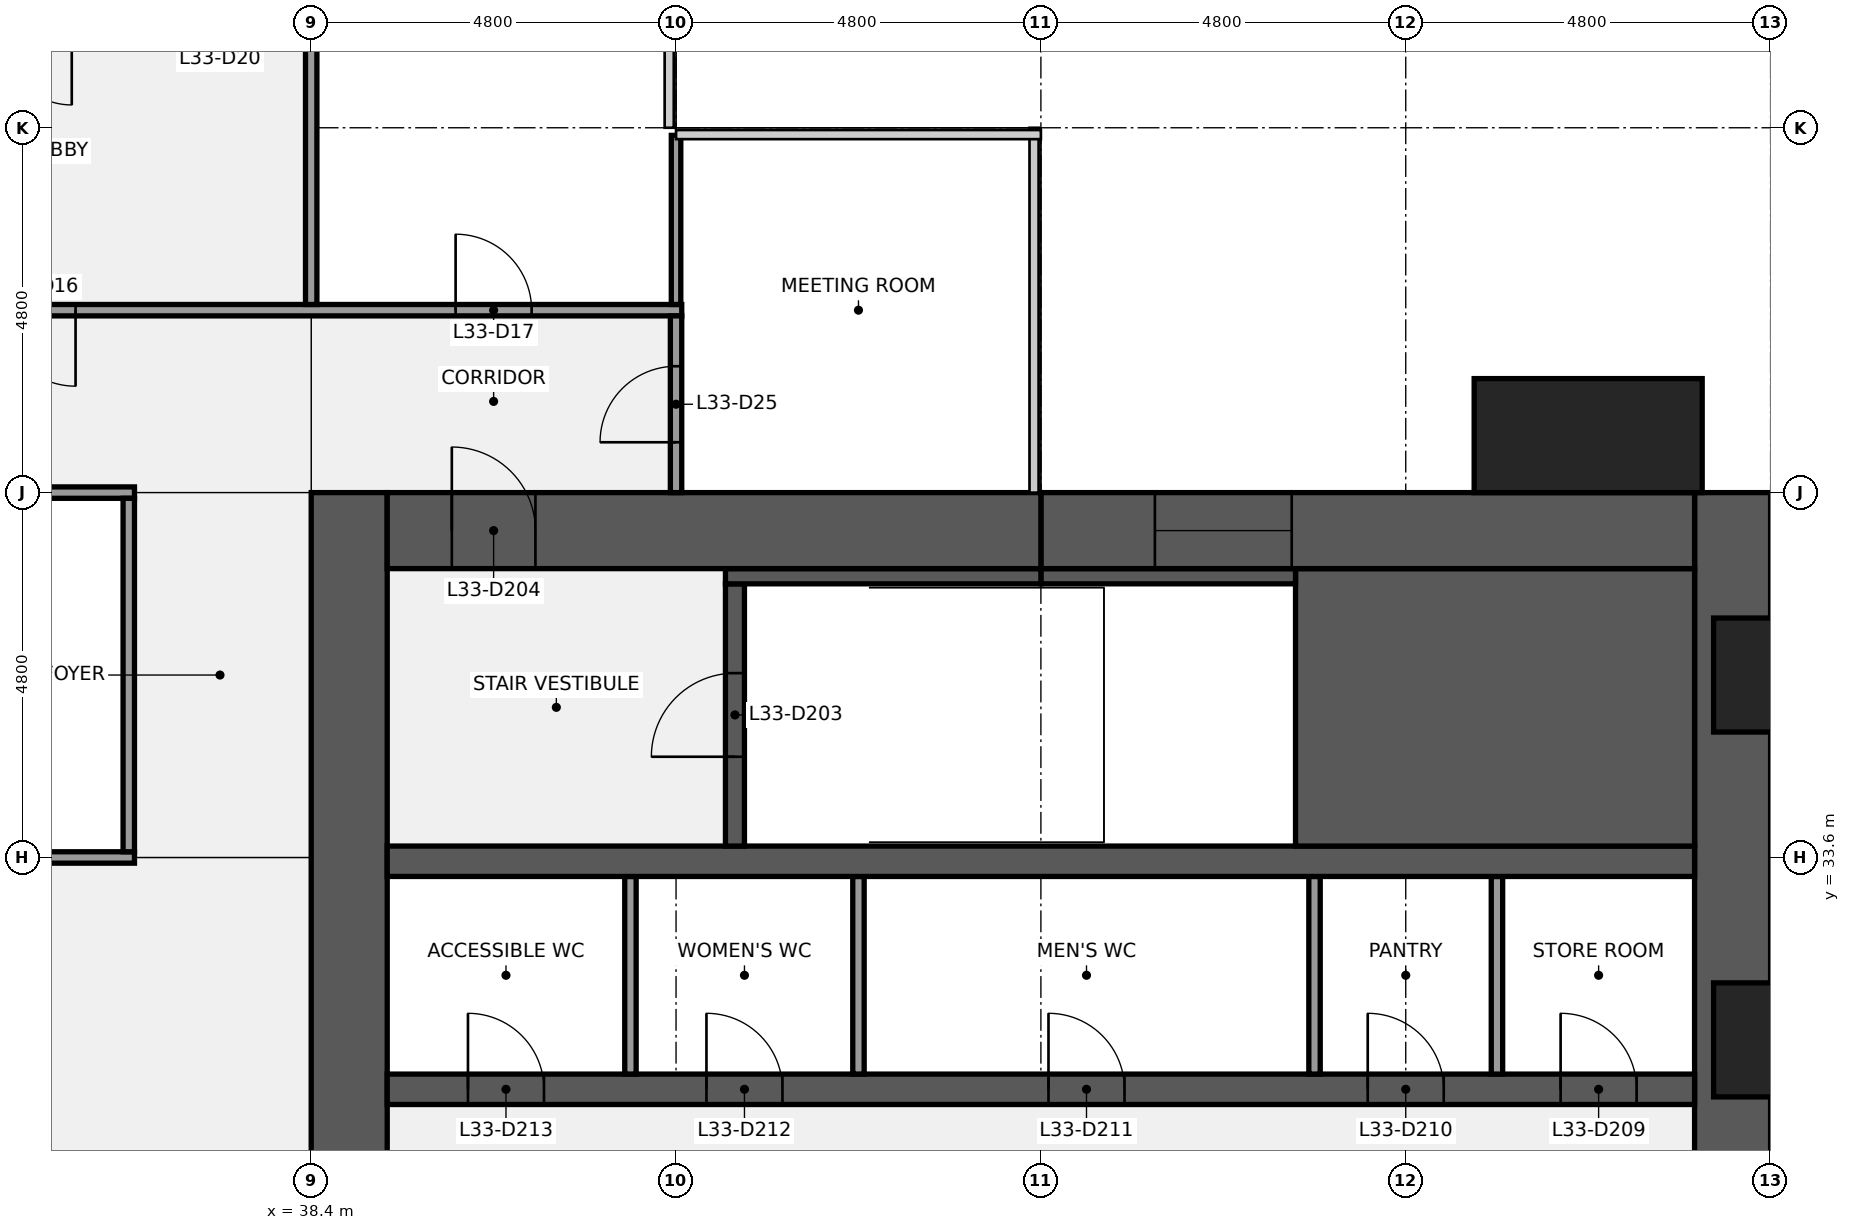
"""IFC4 building model, lengths in metres.
Left out: names, types, materials, properties, quantities, classifications, styles, units other than length and angle.
Written with IfcOpenShell. Run it as: python <this file> out.ifc"""

import sys

from ifc_helpers import new_model, si_unit, direction, frame, frame_2d, origin, origin_2d, place, context, subcontext, project, spatial, rectangle, extrude, element, fill, save


model = new_model("IFC4")
c1 = context("Model", 3, precision=1e-05, world=origin(), true_north=direction((0.0, 1.0)))
c2 = subcontext(c1, "Body", "Model", "MODEL_VIEW")
j1 = project(units=[si_unit("LENGTHUNIT", "METRE"), si_unit("PLANEANGLEUNIT", "RADIAN")], contexts=[c1])
p1 = place(None, origin())
s1 = spatial("IfcSite", under=j1, at=p1, CompositionType="ELEMENT")
p2 = place(p1, origin())
s2 = spatial("IfcBuilding", under=s1, at=p2, CompositionType="ELEMENT")
p3 = place(p2, frame((0.0, 0.0, 152.1)))
s3 = spatial("IfcBuildingStorey", under=s2, at=p3, CompositionType="ELEMENT", Elevation=152.1)
p4 = place(p3, frame((57.1, 38.4, 0.0), z_axis=(0.0, 0.0, 1.0), x_axis=(0.0, -1.0, 0.0)))
e1 = element("IfcWall", 1, at=p4, inside=s3, PredefinedType="SHEAR", context=c2, shape_type="SweptSolid", body=[
    extrude(rectangle(XDim=28.8, YDim=1.0, at=frame_2d((14.4, 0.0))), origin(), (0.0, 0.0, 1.0), 3.84),
])
p5 = place(p4, frame((18.45, 0.0, 0.9)))
e2 = element("IfcOpeningElement", 2, at=p5, cuts=e1, PredefinedType="OPENING", context=c2, shape_type="SweptSolid", body=[
    extrude(rectangle(XDim=1.5, YDim=1.5, at=frame_2d((0.75, 0.75))), frame((0.0, 0.51, 0.0), z_axis=(0.0, -1.0, 0.0), x_axis=(1.0, 0.0, 0.0)), (0.0, 0.0, 1.0), 1.02),
])
p6 = place(p4, frame((8.85, 0.0, 0.9)))
e3 = element("IfcOpeningElement", 3, at=p6, cuts=e1, PredefinedType="OPENING", context=c2, shape_type="SweptSolid", body=[
    extrude(rectangle(XDim=1.5, YDim=1.5, at=frame_2d((0.75, 0.75))), frame((0.0, 0.51, 0.0), z_axis=(0.0, -1.0, 0.0), x_axis=(1.0, 0.0, 0.0)), (0.0, 0.0, 1.0), 1.02),
])
p7 = place(p3, frame((38.9, 9.6, 0.0), z_axis=(0.0, 0.0, 1.0), x_axis=(0.0, 1.0, 0.0)))
e4 = element("IfcWall", 4, at=p7, inside=s3, PredefinedType="SHEAR", context=c2, shape_type="SweptSolid", body=[
    extrude(rectangle(XDim=28.8, YDim=1.0, at=frame_2d((14.4, 0.0))), origin(), (0.0, 0.0, 1.0), 3.84),
])
p8 = place(p7, frame((8.7, 0.0, 0.0)))
e5 = element("IfcOpeningElement", 5, at=p8, cuts=e4, PredefinedType="OPENING", context=c2, shape_type="SweptSolid", body=[
    extrude(rectangle(XDim=1.8, YDim=2.1, at=frame_2d((0.9, 1.05))), frame((0.0, 0.51, 0.0), z_axis=(0.0, -1.0, 0.0), x_axis=(1.0, 0.0, 0.0)), (0.0, 0.0, 1.0), 1.02),
])
p9 = place(p7, frame((18.3, 0.0, 0.0)))
e6 = element("IfcOpeningElement", 6, at=p9, cuts=e4, PredefinedType="OPENING", context=c2, shape_type="SweptSolid", body=[
    extrude(rectangle(XDim=1.8, YDim=2.1, at=frame_2d((0.9, 1.05))), frame((0.0, 0.51, 0.0), z_axis=(0.0, -1.0, 0.0), x_axis=(1.0, 0.0, 0.0)), (0.0, 0.0, 1.0), 1.02),
])
p10 = place(p3, frame((39.4, 30.55, 0.0), z_axis=(0.0, 0.0, 1.0), x_axis=(1.0, 0.0, 0.0)))
e7 = element("IfcWall", 7, at=p10, inside=s3, PredefinedType="SHEAR", context=c2, shape_type="SweptSolid", body=[
    extrude(rectangle(XDim=17.2, YDim=0.4, at=frame_2d((8.6, 0.0))), origin(), (0.0, 0.0, 1.0), 3.84),
])
p11 = place(p10, frame((15.438, 0.0, 0.0)))
e8 = element("IfcOpeningElement", 8, at=p11, cuts=e7, PredefinedType="OPENING", context=c2, shape_type="SweptSolid", body=[
    extrude(rectangle(XDim=1.0, YDim=2.1, at=frame_2d((0.5, 1.05))), frame((0.0, 0.21, 0.0), z_axis=(0.0, -1.0, 0.0), x_axis=(1.0, 0.0, 0.0)), (0.0, 0.0, 1.0), 0.42),
])
p12 = place(p10, frame((12.9, 0.0, 0.0)))
e9 = element("IfcOpeningElement", 9, at=p12, cuts=e7, PredefinedType="OPENING", context=c2, shape_type="SweptSolid", body=[
    extrude(rectangle(XDim=1.0, YDim=2.1, at=frame_2d((0.5, 1.05))), frame((0.0, 0.21, 0.0), z_axis=(0.0, -1.0, 0.0), x_axis=(1.0, 0.0, 0.0)), (0.0, 0.0, 1.0), 0.42),
])
p13 = place(p10, frame((8.7, 0.0, 0.0)))
e10 = element("IfcOpeningElement", 10, at=p13, cuts=e7, PredefinedType="OPENING", context=c2, shape_type="SweptSolid", body=[
    extrude(rectangle(XDim=1.0, YDim=2.1, at=frame_2d((0.5, 1.05))), frame((0.0, 0.21, 0.0), z_axis=(0.0, -1.0, 0.0), x_axis=(1.0, 0.0, 0.0)), (0.0, 0.0, 1.0), 0.42),
])
p14 = place(p10, frame((4.2, 0.0, 0.0)))
e11 = element("IfcOpeningElement", 11, at=p14, cuts=e7, PredefinedType="OPENING", context=c2, shape_type="SweptSolid", body=[
    extrude(rectangle(XDim=1.0, YDim=2.1, at=frame_2d((0.5, 1.05))), frame((0.0, 0.21, 0.0), z_axis=(0.0, -1.0, 0.0), x_axis=(1.0, 0.0, 0.0)), (0.0, 0.0, 1.0), 0.42),
])
p15 = place(p10, frame((1.062, 0.0, 0.0)))
e12 = element("IfcOpeningElement", 12, at=p15, cuts=e7, PredefinedType="OPENING", context=c2, shape_type="SweptSolid", body=[
    extrude(rectangle(XDim=1.0, YDim=2.1, at=frame_2d((0.5, 1.05))), frame((0.0, 0.21, 0.0), z_axis=(0.0, -1.0, 0.0), x_axis=(1.0, 0.0, 0.0)), (0.0, 0.0, 1.0), 0.42),
])
for number, where, z_axis, x_axis in (
    (13, (54.0, 30.75, 0.0), (0.0, 0.0, 1.0), (0.0, 1.0, 0.0)),
    (14, (51.6, 30.75, 0.0), (0.0, 0.0, 1.0), (0.0, 1.0, 0.0)),
    (15, (45.6, 30.75, 0.0), (0.0, 0.0, 1.0), (0.0, 1.0, 0.0)),
    (16, (42.6, 30.75, 0.0), (0.0, 0.0, 1.0), (0.0, 1.0, 0.0)),
):
    element("IfcWall", number, at=place(p3, frame(where, z_axis=z_axis, x_axis=x_axis)), inside=s3, PredefinedType="PARTITIONING", context=c2, shape_type="SweptSolid", body=[
        extrude(rectangle(XDim=2.6, YDim=0.15, at=frame_2d((1.3, 0.0))), origin(), (0.0, 0.0, 1.0), 3.84),
    ])
p16 = place(p3, frame((39.4, 33.55, 0.0), z_axis=(0.0, 0.0, 1.0), x_axis=(1.0, 0.0, 0.0)))
e17 = element("IfcWall", 17, at=p16, inside=s3, PredefinedType="SHEAR", context=c2, shape_type="SweptSolid", body=[
    extrude(rectangle(XDim=17.2, YDim=0.4, at=frame_2d((8.6, 0.0))), origin(), (0.0, 0.0, 1.0), 3.84),
])
p17 = place(p3, frame((51.35, 35.575, 0.0), z_axis=(0.0, 0.0, 1.0), x_axis=(1.0, 0.0, 0.0)))
e18 = element("IfcWall", 18, at=p17, inside=s3, PredefinedType="SHEAR", context=c2, shape_type="SweptSolid", body=[
    extrude(rectangle(XDim=5.25, YDim=3.65, at=frame_2d((2.625, 0.0))), origin(), (0.0, 0.0, 1.0), 3.84),
])
p18 = place(p3, frame((43.975, 33.75, 0.0), z_axis=(0.0, 0.0, 1.0), x_axis=(0.0, 1.0, 0.0)))
e19 = element("IfcWall", 19, at=p18, inside=s3, PredefinedType="SHEAR", context=c2, shape_type="SweptSolid", body=[
    extrude(rectangle(XDim=3.45, YDim=0.25, at=frame_2d((1.725, 0.0))), origin(), (0.0, 0.0, 1.0), 3.84),
])
p19 = place(p18, frame((1.175, 0.0, 0.0)))
e20 = element("IfcOpeningElement", 20, at=p19, cuts=e19, PredefinedType="OPENING", context=c2, shape_type="SweptSolid", body=[
    extrude(rectangle(XDim=1.1, YDim=2.1, at=frame_2d((0.55, 1.05))), frame((0.0, 0.135, 0.0), z_axis=(0.0, -1.0, 0.0), x_axis=(1.0, 0.0, 0.0)), (0.0, 0.0, 1.0), 0.27),
])
p20 = place(p3, frame((48.0, 37.3, 0.0), z_axis=(0.0, 0.0, 1.0), x_axis=(1.0, 0.0, 0.0)))
e21 = element("IfcWall", 21, at=p20, inside=s3, PredefinedType="SHEAR", context=c2, shape_type="SweptSolid", body=[
    extrude(rectangle(XDim=3.35, YDim=0.2, at=frame_2d((1.675, 0.0))), origin(), (0.0, 0.0, 1.0), 3.84),
])
p21 = place(p3, frame((43.85, 37.3, 0.0), z_axis=(0.0, 0.0, 1.0), x_axis=(1.0, 0.0, 0.0)))
e22 = element("IfcWall", 22, at=p21, inside=s3, PredefinedType="SHEAR", context=c2, shape_type="SweptSolid", body=[
    extrude(rectangle(XDim=4.15, YDim=0.2, at=frame_2d((2.075, 0.0))), origin(), (0.0, 0.0, 1.0), 3.84),
])
p22 = place(p3, frame((48.0, 37.9, 0.0), z_axis=(0.0, 0.0, 1.0), x_axis=(1.0, 0.0, 0.0)))
e23 = element("IfcWall", 23, at=p22, inside=s3, PredefinedType="SHEAR", context=c2, shape_type="SweptSolid", body=[
    extrude(rectangle(XDim=8.6, YDim=1.0, at=frame_2d((4.3, 0.0))), origin(), (0.0, 0.0, 1.0), 3.84),
])
p23 = place(p22, frame((1.5, 0.0, 0.9)))
e24 = element("IfcOpeningElement", 24, at=p23, cuts=e23, PredefinedType="OPENING", context=c2, shape_type="SweptSolid", body=[
    extrude(rectangle(XDim=1.8, YDim=1.5, at=frame_2d((0.9, 0.75))), frame((0.0, 0.51, 0.0), z_axis=(0.0, -1.0, 0.0), x_axis=(1.0, 0.0, 0.0)), (0.0, 0.0, 1.0), 1.02),
])
p24 = place(p3, frame((39.4, 37.9, 0.0), z_axis=(0.0, 0.0, 1.0), x_axis=(1.0, 0.0, 0.0)))
e25 = element("IfcWall", 25, at=p24, inside=s3, PredefinedType="SHEAR", context=c2, shape_type="SweptSolid", body=[
    extrude(rectangle(XDim=8.6, YDim=1.0, at=frame_2d((4.3, 0.0))), origin(), (0.0, 0.0, 1.0), 3.84),
])
p25 = place(p24, frame((0.85, 0.0, 0.0)))
e26 = element("IfcOpeningElement", 26, at=p25, cuts=e25, PredefinedType="OPENING", context=c2, shape_type="SweptSolid", body=[
    extrude(rectangle(XDim=1.1, YDim=2.1, at=frame_2d((0.55, 1.05))), frame((0.0, 0.51, 0.0), z_axis=(0.0, -1.0, 0.0), x_axis=(1.0, 0.0, 0.0)), (0.0, 0.0, 1.0), 1.02),
])
p26 = place(p3, frame((31.275, 33.6, 0.0), z_axis=(0.0, 0.0, 1.0), x_axis=(1.0, 0.0, 0.0)))
e27 = element("IfcWall", 27, at=p26, inside=s3, PredefinedType="PARTITIONING", context=c2, shape_type="SweptSolid", body=[
    extrude(rectangle(XDim=4.8, YDim=0.15, at=frame_2d((2.4, 0.0))), origin(), (0.0, 0.0, 1.0), 2.936),
])
p27 = place(p3, frame((21.525, 38.4, 0.0), z_axis=(0.0, 0.0, 1.0), x_axis=(1.0, 0.0, 0.0)))
e28 = element("IfcWall", 28, at=p27, inside=s3, PredefinedType="PARTITIONING", context=c2, shape_type="SweptSolid", body=[
    extrude(rectangle(XDim=14.55, YDim=0.15, at=frame_2d((7.275, 0.0))), origin(), (0.0, 0.0, 1.0), 2.936),
])
p28 = place(p27, frame((3.175, 0.0, 0.0)))
e29 = element("IfcOpeningElement", 29, at=p28, cuts=e28, PredefinedType="OPENING", context=c2, shape_type="SweptSolid", body=[
    extrude(rectangle(XDim=1.0, YDim=2.1, at=frame_2d((0.5, 1.05))), frame((0.0, 0.085, 0.0), z_axis=(0.0, -1.0, 0.0), x_axis=(1.0, 0.0, 0.0)), (0.0, 0.0, 1.0), 0.17),
])
p29 = place(p27, frame((10.375, 0.0, 0.0)))
e30 = element("IfcOpeningElement", 30, at=p29, cuts=e28, PredefinedType="OPENING", context=c2, shape_type="SweptSolid", body=[
    extrude(rectangle(XDim=1.0, YDim=2.1, at=frame_2d((0.5, 1.05))), frame((0.0, 0.085, 0.0), z_axis=(0.0, -1.0, 0.0), x_axis=(1.0, 0.0, 0.0)), (0.0, 0.0, 1.0), 0.17),
])
p30 = place(p3, frame((14.325, 40.8, 0.0), z_axis=(0.0, 0.0, 1.0), x_axis=(1.0, 0.0, 0.0)))
e31 = element("IfcWall", 31, at=p30, inside=s3, PredefinedType="PARTITIONING", context=c2, shape_type="SweptSolid", body=[
    extrude(rectangle(XDim=28.95, YDim=0.15, at=frame_2d((14.475, 0.0))), origin(), (0.0, 0.0, 1.0), 2.936),
])
p31 = place(p30, frame((1.975, 0.0, 0.0)))
e32 = element("IfcOpeningElement", 32, at=p31, cuts=e31, PredefinedType="OPENING", context=c2, shape_type="SweptSolid", body=[
    extrude(rectangle(XDim=1.0, YDim=2.1, at=frame_2d((0.5, 1.05))), frame((0.0, 0.085, 0.0), z_axis=(0.0, -1.0, 0.0), x_axis=(1.0, 0.0, 0.0)), (0.0, 0.0, 1.0), 0.17),
])
p32 = place(p30, frame((5.575, 0.0, 0.0)))
e33 = element("IfcOpeningElement", 33, at=p32, cuts=e31, PredefinedType="OPENING", context=c2, shape_type="SweptSolid", body=[
    extrude(rectangle(XDim=1.0, YDim=2.1, at=frame_2d((0.5, 1.05))), frame((0.0, 0.085, 0.0), z_axis=(0.0, -1.0, 0.0), x_axis=(1.0, 0.0, 0.0)), (0.0, 0.0, 1.0), 0.17),
])
p33 = place(p30, frame((9.175, 0.0, 0.0)))
e34 = element("IfcOpeningElement", 34, at=p33, cuts=e31, PredefinedType="OPENING", context=c2, shape_type="SweptSolid", body=[
    extrude(rectangle(XDim=1.0, YDim=2.1, at=frame_2d((0.5, 1.05))), frame((0.0, 0.085, 0.0), z_axis=(0.0, -1.0, 0.0), x_axis=(1.0, 0.0, 0.0)), (0.0, 0.0, 1.0), 0.17),
])
p34 = place(p30, frame((13.975, 0.0, 0.0)))
e35 = element("IfcOpeningElement", 35, at=p34, cuts=e31, PredefinedType="OPENING", context=c2, shape_type="SweptSolid", body=[
    extrude(rectangle(XDim=1.0, YDim=2.1, at=frame_2d((0.5, 1.05))), frame((0.0, 0.085, 0.0), z_axis=(0.0, -1.0, 0.0), x_axis=(1.0, 0.0, 0.0)), (0.0, 0.0, 1.0), 0.17),
])
p35 = place(p30, frame((19.975, 0.0, 0.0)))
e36 = element("IfcOpeningElement", 36, at=p35, cuts=e31, PredefinedType="OPENING", context=c2, shape_type="SweptSolid", body=[
    extrude(rectangle(XDim=1.0, YDim=2.1, at=frame_2d((0.5, 1.05))), frame((0.0, 0.085, 0.0), z_axis=(0.0, -1.0, 0.0), x_axis=(1.0, 0.0, 0.0)), (0.0, 0.0, 1.0), 0.17),
])
p36 = place(p30, frame((25.975, 0.0, 0.0)))
e37 = element("IfcOpeningElement", 37, at=p36, cuts=e31, PredefinedType="OPENING", context=c2, shape_type="SweptSolid", body=[
    extrude(rectangle(XDim=1.0, YDim=2.1, at=frame_2d((0.5, 1.05))), frame((0.0, 0.085, 0.0), z_axis=(0.0, -1.0, 0.0), x_axis=(1.0, 0.0, 0.0)), (0.0, 0.0, 1.0), 0.17),
])
p37 = place(p3, frame((36.0, 33.675, 0.0), z_axis=(0.0, 0.0, 1.0), x_axis=(0.0, 1.0, 0.0)))
e38 = element("IfcWall", 38, at=p37, inside=s3, PredefinedType="PARTITIONING", context=c2, shape_type="SweptSolid", body=[
    extrude(rectangle(XDim=4.65, YDim=0.15, at=frame_2d((2.325, 0.0))), origin(), (0.0, 0.0, 1.0), 2.936),
])
p38 = place(p3, frame((38.4, 40.875, 0.0), z_axis=(0.0, 0.0, 1.0), x_axis=(0.0, 1.0, 0.0)))
e39 = element("IfcWall", 39, at=p38, inside=s3, PredefinedType="PARTITIONING", context=c2, shape_type="SweptSolid", body=[
    extrude(rectangle(XDim=3.45, YDim=0.15, at=frame_2d((1.725, 0.0))), origin(), (0.0, 0.0, 1.0), 2.936),
])
p39 = place(p3, frame((43.2, 40.875, 0.0), z_axis=(0.0, 0.0, 1.0), x_axis=(0.0, 1.0, 0.0)))
e40 = element("IfcWall", 40, at=p39, inside=s3, PredefinedType="PARTITIONING", context=c2, shape_type="SweptSolid", body=[
    extrude(rectangle(XDim=2.225, YDim=0.125, at=frame_2d((1.113, 0.0))), origin(), (0.0, 0.0, 1.0), 2.936),
])
p40 = place(p3, frame((43.2, 38.4, 0.0), z_axis=(0.0, 0.0, 1.0), x_axis=(0.0, 1.0, 0.0)))
e41 = element("IfcWall", 41, at=p40, inside=s3, PredefinedType="PARTITIONING", context=c2, shape_type="SweptSolid", body=[
    extrude(rectangle(XDim=2.325, YDim=0.15, at=frame_2d((1.163, 0.0))), origin(), (0.0, 0.0, 1.0), 2.936),
])
p41 = place(p40, frame((0.663, 0.0, 0.0)))
e42 = element("IfcOpeningElement", 42, at=p41, cuts=e41, PredefinedType="OPENING", context=c2, shape_type="SweptSolid", body=[
    extrude(rectangle(XDim=1.0, YDim=2.1, at=frame_2d((0.5, 1.05))), frame((0.0, 0.085, 0.0), z_axis=(0.0, -1.0, 0.0), x_axis=(1.0, 0.0, 0.0)), (0.0, 0.0, 1.0), 0.17),
])
p42 = place(p3, frame((55.2, 39.15, 0.0), z_axis=(0.0, 0.0, 1.0), x_axis=(1.0, 0.0, 0.0)))
e43 = element("IfcColumn", 43, at=p42, inside=s3, PredefinedType="PILASTER", context=c2, shape_type="SweptSolid", body=[
    extrude(rectangle(XDim=3.0, YDim=1.5, at=origin_2d()), origin(), (0.0, 0.0, 1.0), 4.0),
])
p43 = place(p19, origin())
e44 = element("IfcDoor", 44, at=p43, inside=s3, OperationType="SINGLE_SWING_LEFT", PredefinedType="DOOR", context=c2, shape_type="SweptSolid", body=[
    extrude(rectangle(XDim=1.1, YDim=2.1, at=frame_2d((0.55, 1.05))), frame((0.0, 0.025, 0.0), z_axis=(0.0, -1.0, 0.0), x_axis=(1.0, 0.0, 0.0)), (0.0, 0.0, 1.0), 0.05),
])
fill(e20, e44)
p44 = place(p25, origin())
e45 = element("IfcDoor", 45, at=p44, inside=s3, OperationType="SINGLE_SWING_LEFT", PredefinedType="DOOR", context=c2, shape_type="SweptSolid", body=[
    extrude(rectangle(XDim=1.1, YDim=2.1, at=frame_2d((0.55, 1.05))), frame((0.0, 0.025, 0.0), z_axis=(0.0, -1.0, 0.0), x_axis=(1.0, 0.0, 0.0)), (0.0, 0.0, 1.0), 0.05),
])
fill(e26, e45)
p45 = place(p11, origin())
e46 = element("IfcDoor", 46, at=p45, inside=s3, OperationType="SINGLE_SWING_LEFT", PredefinedType="DOOR", context=c2, shape_type="SweptSolid", body=[
    extrude(rectangle(XDim=1.0, YDim=2.1, at=frame_2d((0.5, 1.05))), frame((0.0, 0.025, 0.0), z_axis=(0.0, -1.0, 0.0), x_axis=(1.0, 0.0, 0.0)), (0.0, 0.0, 1.0), 0.05),
])
fill(e8, e46)
p46 = place(p12, origin())
e47 = element("IfcDoor", 47, at=p46, inside=s3, OperationType="SINGLE_SWING_LEFT", PredefinedType="DOOR", context=c2, shape_type="SweptSolid", body=[
    extrude(rectangle(XDim=1.0, YDim=2.1, at=frame_2d((0.5, 1.05))), frame((0.0, 0.025, 0.0), z_axis=(0.0, -1.0, 0.0), x_axis=(1.0, 0.0, 0.0)), (0.0, 0.0, 1.0), 0.05),
])
fill(e9, e47)
p47 = place(p13, origin())
e48 = element("IfcDoor", 48, at=p47, inside=s3, OperationType="SINGLE_SWING_LEFT", PredefinedType="DOOR", context=c2, shape_type="SweptSolid", body=[
    extrude(rectangle(XDim=1.0, YDim=2.1, at=frame_2d((0.5, 1.05))), frame((0.0, 0.025, 0.0), z_axis=(0.0, -1.0, 0.0), x_axis=(1.0, 0.0, 0.0)), (0.0, 0.0, 1.0), 0.05),
])
fill(e10, e48)
p48 = place(p14, origin())
e49 = element("IfcDoor", 49, at=p48, inside=s3, OperationType="SINGLE_SWING_LEFT", PredefinedType="DOOR", context=c2, shape_type="SweptSolid", body=[
    extrude(rectangle(XDim=1.0, YDim=2.1, at=frame_2d((0.5, 1.05))), frame((0.0, 0.025, 0.0), z_axis=(0.0, -1.0, 0.0), x_axis=(1.0, 0.0, 0.0)), (0.0, 0.0, 1.0), 0.05),
])
fill(e11, e49)
p49 = place(p15, origin())
e50 = element("IfcDoor", 50, at=p49, inside=s3, OperationType="SINGLE_SWING_LEFT", PredefinedType="DOOR", context=c2, shape_type="SweptSolid", body=[
    extrude(rectangle(XDim=1.0, YDim=2.1, at=frame_2d((0.5, 1.05))), frame((0.0, 0.025, 0.0), z_axis=(0.0, -1.0, 0.0), x_axis=(1.0, 0.0, 0.0)), (0.0, 0.0, 1.0), 0.05),
])
fill(e12, e50)
p50 = place(p23, origin())
e51 = element("IfcWindow", 51, at=p50, inside=s3, PartitioningType="SINGLE_PANEL", PredefinedType="WINDOW", context=c2, shape_type="SweptSolid", body=[
    extrude(rectangle(XDim=1.8, YDim=1.5, at=frame_2d((0.9, 0.75))), frame((0.0, 0.03, 0.0), z_axis=(0.0, -1.0, 0.0), x_axis=(1.0, 0.0, 0.0)), (0.0, 0.0, 1.0), 0.06),
])
fill(e24, e51)
p51 = place(p35, origin())
e52 = element("IfcDoor", 52, at=p51, inside=s3, OperationType="SINGLE_SWING_RIGHT", PredefinedType="DOOR", context=c2, shape_type="SweptSolid", body=[
    extrude(rectangle(XDim=1.0, YDim=2.1, at=frame_2d((0.5, 1.05))), frame((0.0, 0.025, 0.0), z_axis=(0.0, -1.0, 0.0), x_axis=(1.0, 0.0, 0.0)), (0.0, 0.0, 1.0), 0.05),
])
fill(e36, e52)
p52 = place(p36, origin())
e53 = element("IfcDoor", 53, at=p52, inside=s3, OperationType="SINGLE_SWING_LEFT", PredefinedType="DOOR", context=c2, shape_type="SweptSolid", body=[
    extrude(rectangle(XDim=1.0, YDim=2.1, at=frame_2d((0.5, 1.05))), frame((0.0, 0.025, 0.0), z_axis=(0.0, -1.0, 0.0), x_axis=(1.0, 0.0, 0.0)), (0.0, 0.0, 1.0), 0.05),
])
fill(e37, e53)
p53 = place(p41, origin())
e54 = element("IfcDoor", 54, at=p53, inside=s3, OperationType="SINGLE_SWING_LEFT", PredefinedType="DOOR", context=c2, shape_type="SweptSolid", body=[
    extrude(rectangle(XDim=1.0, YDim=2.1, at=frame_2d((0.5, 1.05))), frame((0.0, 0.025, 0.0), z_axis=(0.0, -1.0, 0.0), x_axis=(1.0, 0.0, 0.0)), (0.0, 0.0, 1.0), 0.05),
])
fill(e42, e54)
save(model, sys.argv[1])
